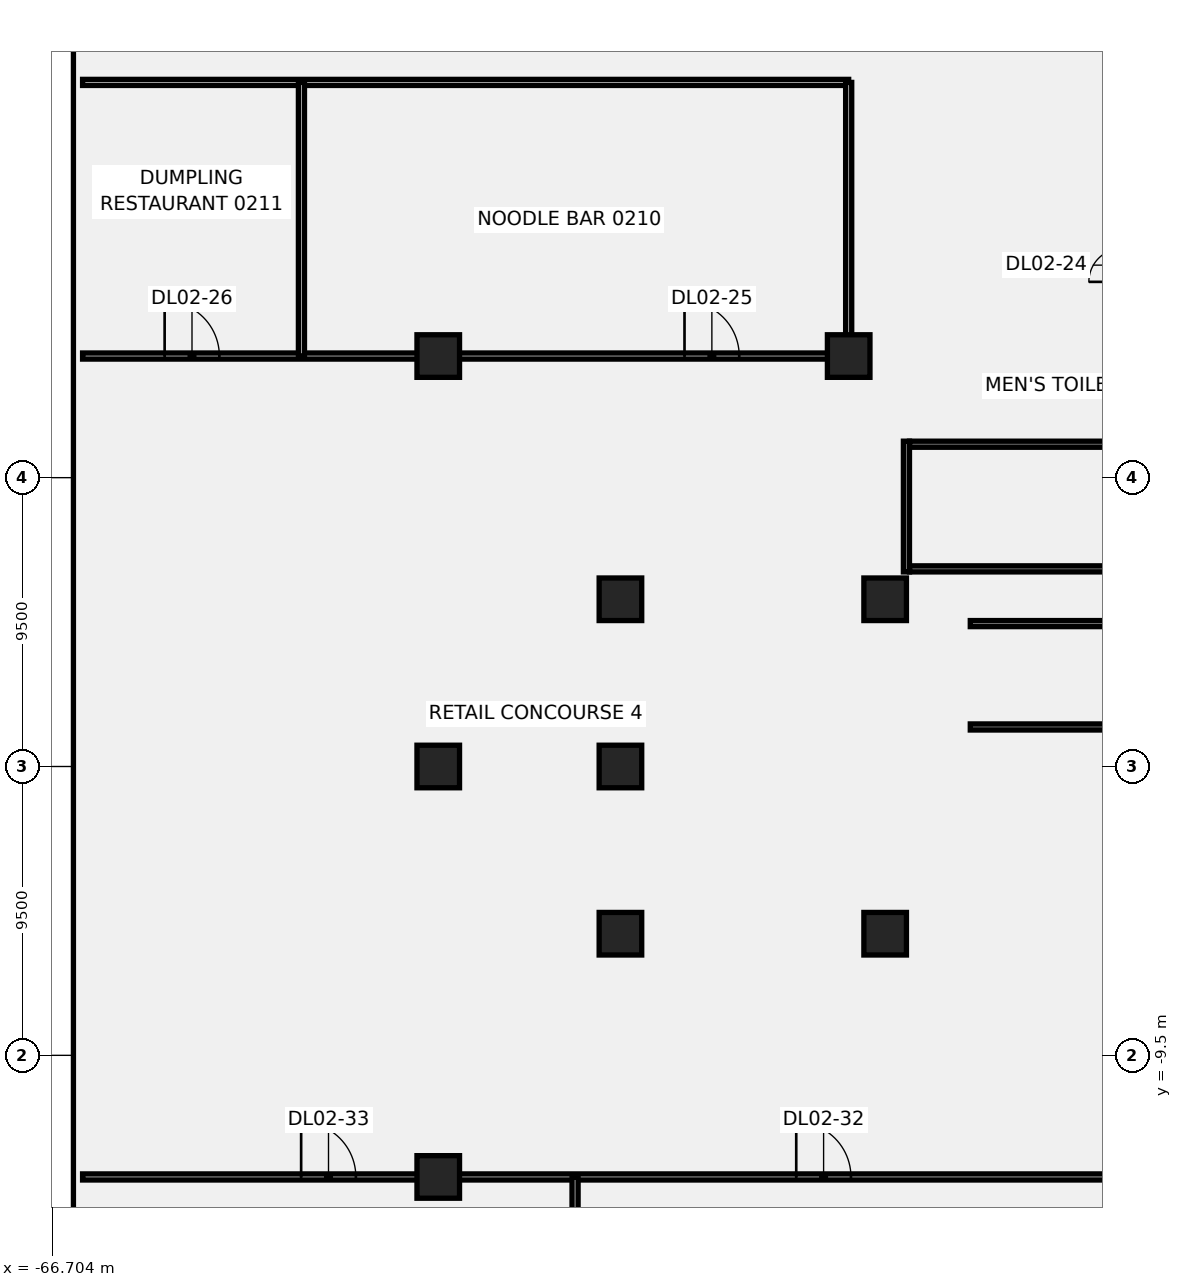
"""IFC4 building model, lengths in metres.
Left out: names, types, materials, properties, quantities, classifications, styles, units other than length and angle.
Written with IfcOpenShell. Run it as: python <this file> out.ifc"""

import sys

from ifc_helpers import new_model, si_unit, direction, frame, frame_2d, origin, origin_2d, place, context, subcontext, project, spatial, polyline, rectangle, outline, extrude, element, fill, save


model = new_model("IFC4")
c1 = context("Model", 3, precision=1e-05, world=origin(), true_north=direction((0.0, 1.0)))
c2 = subcontext(c1, "Body", "Model", "MODEL_VIEW")
j1 = project(units=[si_unit("LENGTHUNIT", "METRE"), si_unit("PLANEANGLEUNIT", "RADIAN")], contexts=[c1])
p1 = place(None, origin())
s1 = spatial("IfcSite", under=j1, at=p1, CompositionType="ELEMENT")
p2 = place(p1, origin())
s2 = spatial("IfcBuilding", under=s1, at=p2, CompositionType="ELEMENT")
p3 = place(p2, frame((0.0, 0.0, 15.0)))
s3 = spatial("IfcBuildingStorey", under=s2, at=p3, CompositionType="ELEMENT", Elevation=15.0)
for number, where, z_axis, x_axis in (
    (1, (-39.3, -5.5, -0.5), (0.0, 0.0, 1.0), (1.0, 0.0, 0.0)),
    (2, (-39.3, 5.5, -0.5), (0.0, 0.0, 1.0), (1.0, 0.0, 0.0)),
    (3, (-48.008, 5.5, -0.5), (0.0, 0.0, 1.0), (1.0, 0.0, 0.0)),
    (4, (-48.008, 0.0, -0.5), (0.0, 0.0, 1.0), (1.0, 0.0, 0.0)),
    (5, (-48.008, -5.5, -0.5), (0.0, 0.0, 1.0), (1.0, 0.0, 0.0)),
    (6, (-54.0, -13.5, -0.5), (0.0, 0.0, 1.0), (1.0, 0.0, 0.0)),
    (7, (-54.0, 0.0, -0.5), (0.0, 0.0, 1.0), (1.0, 0.0, 0.0)),
    (8, (-54.0, 13.5, -0.5), (0.0, 0.0, 1.0), (1.0, 0.0, 0.0)),
    (9, (-40.5, 13.5, -0.5), (0.0, 0.0, 1.0), (1.0, 0.0, 0.0)),
):
    element("IfcColumn", number, at=place(p3, frame(where, z_axis=z_axis, x_axis=x_axis)), inside=s3, PredefinedType="COLUMN", context=c2, shape_type="SweptSolid", body=[
        extrude(rectangle(XDim=1.4, YDim=1.4, at=origin_2d()), origin(), (0.0, 0.0, 1.0), 5.0),
    ])
p4 = place(p3, frame((-65.699, -13.5, 0.0), z_axis=(0.0, 0.0, 1.0), x_axis=(1.0, 0.0, 0.0)))
e10 = element("IfcWall", 10, at=p4, inside=s3, PredefinedType="PARTITIONING", context=c2, shape_type="SweptSolid", body=[
    extrude(rectangle(XDim=43.199, YDim=0.2, at=frame_2d((21.6, 0.0))), origin(), (0.0, 0.0, 1.0), 4.5),
])
p5 = place(p4, frame((38.685, 0.0, 0.0)))
e11 = element("IfcOpeningElement", 11, at=p5, cuts=e10, PredefinedType="OPENING", context=c2, shape_type="SweptSolid", body=[
    extrude(rectangle(XDim=1.8, YDim=2.1, at=frame_2d((0.9, 1.05))), frame((0.0, 0.11, 0.0), z_axis=(0.0, -1.0, 0.0), x_axis=(1.0, 0.0, 0.0)), (0.0, 0.0, 1.0), 0.22),
])
p6 = place(p4, frame((23.474, 0.0, 0.0)))
e12 = element("IfcOpeningElement", 12, at=p6, cuts=e10, PredefinedType="OPENING", context=c2, shape_type="SweptSolid", body=[
    extrude(rectangle(XDim=1.8, YDim=2.1, at=frame_2d((0.9, 1.05))), frame((0.0, 0.11, 0.0), z_axis=(0.0, -1.0, 0.0), x_axis=(1.0, 0.0, 0.0)), (0.0, 0.0, 1.0), 0.22),
])
p7 = place(p4, frame((7.189, 0.0, 0.0)))
e13 = element("IfcOpeningElement", 13, at=p7, cuts=e10, PredefinedType="OPENING", context=c2, shape_type="SweptSolid", body=[
    extrude(rectangle(XDim=1.8, YDim=2.1, at=frame_2d((0.9, 1.05))), frame((0.0, 0.11, 0.0), z_axis=(0.0, -1.0, 0.0), x_axis=(1.0, 0.0, 0.0)), (0.0, 0.0, 1.0), 0.22),
])
p8 = place(p3, frame((-65.699, 13.5, 0.0), z_axis=(0.0, 0.0, 1.0), x_axis=(1.0, 0.0, 0.0)))
e14 = element("IfcWall", 14, at=p8, inside=s3, PredefinedType="PARTITIONING", context=c2, shape_type="SweptSolid", body=[
    extrude(rectangle(XDim=25.199, YDim=0.2, at=frame_2d((12.6, 0.0))), origin(), (0.0, 0.0, 1.0), 4.5),
])
p9 = place(p8, frame((19.799, 0.0, 0.0)))
e15 = element("IfcOpeningElement", 15, at=p9, cuts=e14, PredefinedType="OPENING", context=c2, shape_type="SweptSolid", body=[
    extrude(rectangle(XDim=1.8, YDim=2.1, at=frame_2d((0.9, 1.05))), frame((0.0, 0.11, 0.0), z_axis=(0.0, -1.0, 0.0), x_axis=(1.0, 0.0, 0.0)), (0.0, 0.0, 1.0), 0.22),
])
p10 = place(p8, frame((2.699, 0.0, 0.0)))
e16 = element("IfcOpeningElement", 16, at=p10, cuts=e14, PredefinedType="OPENING", context=c2, shape_type="SweptSolid", body=[
    extrude(rectangle(XDim=1.8, YDim=2.1, at=frame_2d((0.9, 1.05))), frame((0.0, 0.11, 0.0), z_axis=(0.0, -1.0, 0.0), x_axis=(1.0, 0.0, 0.0)), (0.0, 0.0, 1.0), 0.22),
])
p11 = place(p3, frame((-65.699, 22.5, 0.0), z_axis=(0.0, 0.0, 1.0), x_axis=(1.0, 0.0, 0.0)))
e17 = element("IfcWall", 17, at=p11, inside=s3, PredefinedType="PARTITIONING", context=c2, shape_type="SweptSolid", body=[
    extrude(rectangle(XDim=25.199, YDim=0.2, at=frame_2d((12.6, 0.0))), origin(), (0.0, 0.0, 1.0), 4.5),
])
for number, where, z_axis, x_axis in (
    (18, (-40.5, 13.5, 0.0), (0.0, 0.0, 1.0), (0.0, 1.0, 0.0)),
    (19, (-58.5, 13.5, 0.0), (0.0, 0.0, 1.0), (0.0, 1.0, 0.0)),
):
    element("IfcWall", number, at=place(p3, frame(where, z_axis=z_axis, x_axis=x_axis)), inside=s3, PredefinedType="PARTITIONING", context=c2, shape_type="SweptSolid", body=[
        extrude(rectangle(XDim=9.0, YDim=0.2, at=frame_2d((4.5, 0.0))), origin(), (0.0, 0.0, 1.0), 4.5),
    ])
p12 = place(p3, frame((-49.5, -18.82, 0.0), z_axis=(0.0, 0.0, 1.0), x_axis=(0.0, 1.0, 0.0)))
e20 = element("IfcWall", 20, at=p12, inside=s3, PredefinedType="PARTITIONING", context=c2, shape_type="SweptSolid", body=[
    extrude(rectangle(XDim=5.32, YDim=0.2, at=frame_2d((2.66, 0.0))), origin(), (0.0, 0.0, 1.0), 4.5),
])
for number, where, z_axis, x_axis in (
    (21, (-28.8, 10.6, 0.0), (0.0, 0.0, 1.0), (-1.0, 0.0, 0.0)),
    (22, (-28.8, 6.5, 0.0), (0.0, 0.0, 1.0), (-1.0, 0.0, 0.0)),
):
    element("IfcWall", number, at=place(p3, frame(where, z_axis=z_axis, x_axis=x_axis)), inside=s3, PredefinedType="SOLIDWALL", context=c2, shape_type="SweptSolid", body=[
        extrude(rectangle(XDim=9.7, YDim=0.2, at=frame_2d((4.85, 0.0))), origin(), (0.0, 0.0, 1.0), 4.5),
    ])
p13 = place(p3, frame((-38.6, 10.7, 0.0), z_axis=(0.0, 0.0, 1.0), x_axis=(0.0, -1.0, 0.0)))
e23 = element("IfcWall", 23, at=p13, inside=s3, PredefinedType="SOLIDWALL", context=c2, shape_type="SweptSolid", body=[
    extrude(rectangle(XDim=4.3, YDim=0.2, at=frame_2d((2.15, 0.0))), origin(), (0.0, 0.0, 1.0), 4.5),
])
p14 = place(p3, frame((-29.8, 1.3, 0.0), z_axis=(0.0, 0.0, 1.0), x_axis=(-1.0, 0.0, 0.0)))
e24 = element("IfcWall", 24, at=p14, inside=s3, PredefinedType="SHEAR", context=c2, shape_type="SweptSolid", body=[
    extrude(rectangle(XDim=6.7, YDim=0.2, at=frame_2d((3.35, 0.0))), origin(), (0.0, 0.0, 1.0), 4.5),
])
p15 = place(p14, frame((0.35, 0.0, 0.0)))
e25 = element("IfcOpeningElement", 25, at=p15, cuts=e24, PredefinedType="OPENING", context=c2, shape_type="SweptSolid", body=[
    extrude(rectangle(XDim=1.0, YDim=2.1, at=frame_2d((0.5, 1.05))), frame((0.0, 0.11, 0.0), z_axis=(0.0, -1.0, 0.0), x_axis=(1.0, 0.0, 0.0)), (0.0, 0.0, 1.0), 0.22),
])
p16 = place(p3, frame((-29.8, 4.7, 0.0), z_axis=(0.0, 0.0, 1.0), x_axis=(-1.0, 0.0, 0.0)))
e26 = element("IfcWall", 26, at=p16, inside=s3, PredefinedType="SHEAR", context=c2, shape_type="SweptSolid", body=[
    extrude(rectangle(XDim=6.7, YDim=0.2, at=frame_2d((3.35, 0.0))), origin(), (0.0, 0.0, 1.0), 4.5),
])
p17 = place(p3, origin())
e27 = element("IfcWall", 27, at=p17, inside=s3, PredefinedType="SHEAR", context=c2, shape_type="SweptSolid", body=[
    extrude(outline(polyline([(-36.3, 4.6), (-36.5, 4.6), (-36.5, 1.4), (-36.3, 1.4), (-36.3, 4.6)])), origin(), (0.0, 0.0, 1.0), 4.5),
])
p18 = place(p9, origin())
e28 = element("IfcDoor", 28, at=p18, inside=s3, OperationType="SINGLE_SWING_LEFT", PredefinedType="DOOR", context=c2, shape_type="SweptSolid", body=[
    extrude(rectangle(XDim=1.8, YDim=2.1, at=frame_2d((0.9, 1.05))), frame((0.0, 0.025, 0.0), z_axis=(0.0, -1.0, 0.0), x_axis=(1.0, 0.0, 0.0)), (0.0, 0.0, 1.0), 0.05),
])
fill(e15, e28)
p19 = place(p10, origin())
e29 = element("IfcDoor", 29, at=p19, inside=s3, OperationType="SINGLE_SWING_RIGHT", PredefinedType="DOOR", context=c2, shape_type="SweptSolid", body=[
    extrude(rectangle(XDim=1.8, YDim=2.1, at=frame_2d((0.9, 1.05))), frame((0.0, 0.025, 0.0), z_axis=(0.0, -1.0, 0.0), x_axis=(1.0, 0.0, 0.0)), (0.0, 0.0, 1.0), 0.05),
])
fill(e16, e29)
p20 = place(p6, origin())
e30 = element("IfcDoor", 30, at=p20, inside=s3, OperationType="SINGLE_SWING_RIGHT", PredefinedType="DOOR", context=c2, shape_type="SweptSolid", body=[
    extrude(rectangle(XDim=1.8, YDim=2.1, at=frame_2d((0.9, 1.05))), frame((0.0, 0.025, 0.0), z_axis=(0.0, -1.0, 0.0), x_axis=(1.0, 0.0, 0.0)), (0.0, 0.0, 1.0), 0.05),
])
fill(e12, e30)
p21 = place(p7, origin())
e31 = element("IfcDoor", 31, at=p21, inside=s3, OperationType="SINGLE_SWING_LEFT", PredefinedType="DOOR", context=c2, shape_type="SweptSolid", body=[
    extrude(rectangle(XDim=1.8, YDim=2.1, at=frame_2d((0.9, 1.05))), frame((0.0, 0.025, 0.0), z_axis=(0.0, -1.0, 0.0), x_axis=(1.0, 0.0, 0.0)), (0.0, 0.0, 1.0), 0.05),
])
fill(e13, e31)
save(model, sys.argv[1])
